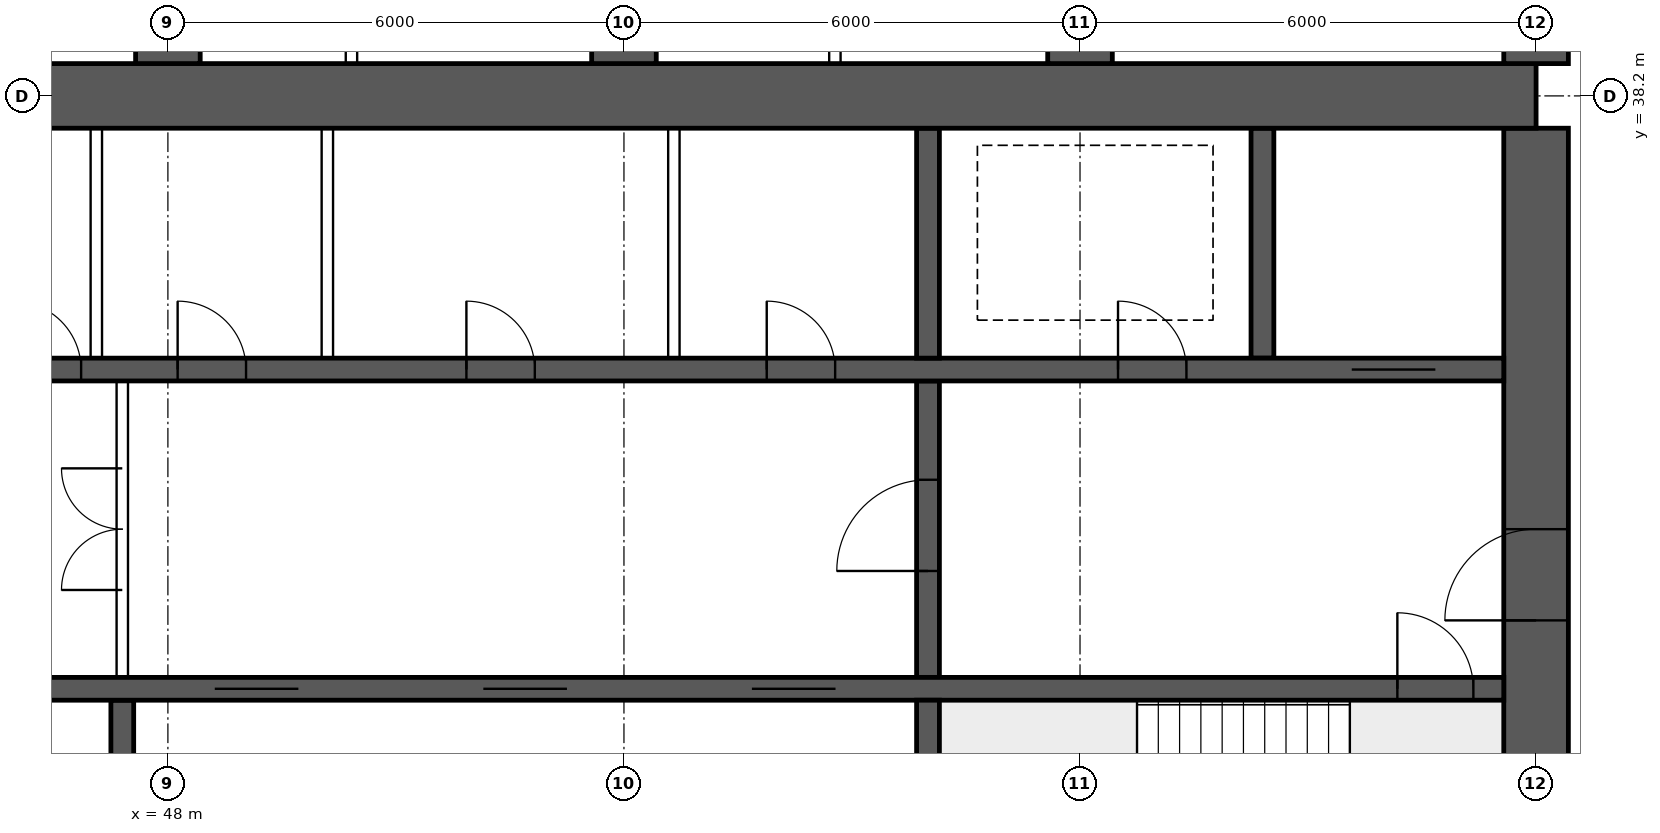
"""IFC4 building model, lengths in metres.
Left out: names, types, materials, properties, quantities, classifications, styles, units other than length and angle.
Written with IfcOpenShell. Run it as: python <this file> out.ifc"""

import sys

from ifc_helpers import new_model, si_unit, direction, frame, frame_2d, origin, place, context, subcontext, project, spatial, rectangle, extrude, element, fill, save


model = new_model("IFC4")
c1 = context("Model", 3, precision=1e-05, world=origin(), true_north=direction((0.0, 1.0)))
c2 = subcontext(c1, "Body", "Model", "MODEL_VIEW")
j1 = project(units=[si_unit("LENGTHUNIT", "METRE"), si_unit("PLANEANGLEUNIT", "RADIAN")], contexts=[c1])
p1 = place(None, origin())
s1 = spatial("IfcSite", under=j1, at=p1, CompositionType="ELEMENT")
p2 = place(p1, origin())
s2 = spatial("IfcBuilding", under=s1, at=p2, CompositionType="ELEMENT")
p3 = place(p2, frame((0.0, 0.0, 148.6)))
s3 = spatial("IfcBuildingStorey", under=s2, at=p3, CompositionType="ELEMENT", Elevation=148.6)
p4 = place(p3, frame((18.0, 38.2, 0.0), z_axis=(0.0, 0.0, 1.0), x_axis=(1.0, 0.0, 0.0)))
e1 = element("IfcWall", 1, at=p4, inside=s3, PredefinedType="SHEAR", context=c2, shape_type="SweptSolid", body=[
    extrude(rectangle(XDim=48.0, YDim=0.85, at=frame_2d((24.0, 0.0))), origin(), (0.0, 0.0, 1.0), 3.75),
])
p5 = place(p3, frame((66.0, 26.225, 0.0), z_axis=(0.0, 0.0, 1.0), x_axis=(0.0, 1.0, 0.0)))
e2 = element("IfcWall", 2, at=p5, inside=s3, PredefinedType="SHEAR", context=c2, shape_type="SweptSolid", body=[
    extrude(rectangle(XDim=11.55, YDim=0.85, at=frame_2d((5.775, 0.0))), origin(), (0.0, 0.0, 1.0), 3.75),
])
p6 = place(p5, frame((5.075, 0.0, 0.0)))
e3 = element("IfcOpeningElement", 3, at=p6, cuts=e2, PredefinedType="OPENING", context=c2, shape_type="SweptSolid", body=[
    extrude(rectangle(XDim=1.2, YDim=2.1, at=frame_2d((0.6, 1.05))), frame((0.0, 0.435, 0.0), z_axis=(0.0, -1.0, 0.0), x_axis=(1.0, 0.0, 0.0)), (0.0, 0.0, 1.0), 0.87),
])
p7 = place(p3, frame((18.425, 30.4, 0.0), z_axis=(0.0, 0.0, 1.0), x_axis=(1.0, 0.0, 0.0)))
e4 = element("IfcWall", 4, at=p7, inside=s3, PredefinedType="SHEAR", context=c2, shape_type="SweptSolid", body=[
    extrude(rectangle(XDim=47.15, YDim=0.3, at=frame_2d((23.575, 0.0))), origin(), (0.0, 0.0, 1.0), 3.75),
])
p8 = place(p7, frame((0.4, 0.0, 0.0)))
e5 = element("IfcOpeningElement", 5, at=p8, cuts=e4, PredefinedType="OPENING", context=c2, shape_type="SweptSolid", body=[
    extrude(rectangle(XDim=1.0, YDim=2.1, at=frame_2d((0.5, 1.05))), frame((0.0, 0.16, 0.0), z_axis=(0.0, -1.0, 0.0), x_axis=(1.0, 0.0, 0.0)), (0.0, 0.0, 1.0), 0.32),
])
p9 = place(p7, frame((45.75, 0.0, 0.0)))
e6 = element("IfcOpeningElement", 6, at=p9, cuts=e4, PredefinedType="OPENING", context=c2, shape_type="SweptSolid", body=[
    extrude(rectangle(XDim=1.0, YDim=2.1, at=frame_2d((0.5, 1.05))), frame((0.0, 0.16, 0.0), z_axis=(0.0, -1.0, 0.0), x_axis=(1.0, 0.0, 0.0)), (0.0, 0.0, 1.0), 0.32),
])
p10 = place(p7, frame((8.325, 0.0, 0.0)))
e7 = element("IfcOpeningElement", 7, at=p10, cuts=e4, PredefinedType="OPENING", context=c2, shape_type="SweptSolid", body=[
    extrude(rectangle(XDim=1.1, YDim=2.1, at=frame_2d((0.55, 1.05))), frame((0.0, 0.16, 0.0), z_axis=(0.0, -1.0, 0.0), x_axis=(1.0, 0.0, 0.0)), (0.0, 0.0, 1.0), 0.32),
])
p11 = place(p7, frame((10.925, 0.0, 0.0)))
e8 = element("IfcOpeningElement", 8, at=p11, cuts=e4, PredefinedType="OPENING", context=c2, shape_type="SweptSolid", body=[
    extrude(rectangle(XDim=1.1, YDim=2.1, at=frame_2d((0.55, 1.05))), frame((0.0, 0.16, 0.0), z_axis=(0.0, -1.0, 0.0), x_axis=(1.0, 0.0, 0.0)), (0.0, 0.0, 1.0), 0.32),
])
p12 = place(p7, frame((13.525, 0.0, 0.0)))
e9 = element("IfcOpeningElement", 9, at=p12, cuts=e4, PredefinedType="OPENING", context=c2, shape_type="SweptSolid", body=[
    extrude(rectangle(XDim=1.1, YDim=2.1, at=frame_2d((0.55, 1.05))), frame((0.0, 0.16, 0.0), z_axis=(0.0, -1.0, 0.0), x_axis=(1.0, 0.0, 0.0)), (0.0, 0.0, 1.0), 0.32),
])
p13 = place(p7, frame((16.125, 0.0, 0.0)))
e10 = element("IfcOpeningElement", 10, at=p13, cuts=e4, PredefinedType="OPENING", context=c2, shape_type="SweptSolid", body=[
    extrude(rectangle(XDim=1.1, YDim=2.1, at=frame_2d((0.55, 1.05))), frame((0.0, 0.16, 0.0), z_axis=(0.0, -1.0, 0.0), x_axis=(1.0, 0.0, 0.0)), (0.0, 0.0, 1.0), 0.32),
])
p14 = place(p7, frame((18.9, 0.0, 0.0)))
e11 = element("IfcOpeningElement", 11, at=p14, cuts=e4, PredefinedType="OPENING", context=c2, shape_type="SweptSolid", body=[
    extrude(rectangle(XDim=0.9, YDim=2.1, at=frame_2d((0.45, 1.05))), frame((0.0, 0.16, 0.0), z_axis=(0.0, -1.0, 0.0), x_axis=(1.0, 0.0, 0.0)), (0.0, 0.0, 1.0), 0.32),
])
p15 = place(p7, frame((30.192, 0.0, 0.0)))
e12 = element("IfcOpeningElement", 12, at=p15, cuts=e4, PredefinedType="OPENING", context=c2, shape_type="SweptSolid", body=[
    extrude(rectangle(XDim=1.1, YDim=2.1, at=frame_2d((0.55, 1.05))), frame((0.0, 0.16, 0.0), z_axis=(0.0, -1.0, 0.0), x_axis=(1.0, 0.0, 0.0)), (0.0, 0.0, 1.0), 0.32),
])
p16 = place(p7, frame((33.725, 0.0, 0.0)))
e13 = element("IfcOpeningElement", 13, at=p16, cuts=e4, PredefinedType="OPENING", context=c2, shape_type="SweptSolid", body=[
    extrude(rectangle(XDim=1.1, YDim=2.1, at=frame_2d((0.55, 1.05))), frame((0.0, 0.16, 0.0), z_axis=(0.0, -1.0, 0.0), x_axis=(1.0, 0.0, 0.0)), (0.0, 0.0, 1.0), 0.32),
])
p17 = place(p7, frame((37.258, 0.0, 0.0)))
e14 = element("IfcOpeningElement", 14, at=p17, cuts=e4, PredefinedType="OPENING", context=c2, shape_type="SweptSolid", body=[
    extrude(rectangle(XDim=1.1, YDim=2.1, at=frame_2d((0.55, 1.05))), frame((0.0, 0.16, 0.0), z_axis=(0.0, -1.0, 0.0), x_axis=(1.0, 0.0, 0.0)), (0.0, 0.0, 1.0), 0.32),
])
p18 = place(p3, frame((18.425, 34.6, 0.0), z_axis=(0.0, 0.0, 1.0), x_axis=(1.0, 0.0, 0.0)))
e15 = element("IfcWall", 15, at=p18, inside=s3, PredefinedType="SHEAR", context=c2, shape_type="SweptSolid", body=[
    extrude(rectangle(XDim=47.15, YDim=0.3, at=frame_2d((23.575, 0.0))), origin(), (0.0, 0.0, 1.0), 3.75),
])
p19 = place(p18, frame((0.9, 0.0, 0.0)))
e16 = element("IfcOpeningElement", 16, at=p19, cuts=e15, PredefinedType="OPENING", context=c2, shape_type="SweptSolid", body=[
    extrude(rectangle(XDim=1.1, YDim=2.1, at=frame_2d((0.55, 1.05))), frame((0.0, 0.16, 0.0), z_axis=(0.0, -1.0, 0.0), x_axis=(1.0, 0.0, 0.0)), (0.0, 0.0, 1.0), 0.32),
])
p20 = place(p18, frame((45.15, 0.0, 0.0)))
e17 = element("IfcOpeningElement", 17, at=p20, cuts=e15, PredefinedType="OPENING", context=c2, shape_type="SweptSolid", body=[
    extrude(rectangle(XDim=1.1, YDim=2.1, at=frame_2d((0.55, 1.05))), frame((0.0, 0.16, 0.0), z_axis=(0.0, -1.0, 0.0), x_axis=(1.0, 0.0, 0.0)), (0.0, 0.0, 1.0), 0.32),
])
p21 = place(p18, frame((4.175, 0.0, 0.0)))
e18 = element("IfcOpeningElement", 18, at=p21, cuts=e15, PredefinedType="OPENING", context=c2, shape_type="SweptSolid", body=[
    extrude(rectangle(XDim=0.9, YDim=2.1, at=frame_2d((0.45, 1.05))), frame((0.0, 0.16, 0.0), z_axis=(0.0, -1.0, 0.0), x_axis=(1.0, 0.0, 0.0)), (0.0, 0.0, 1.0), 0.32),
])
p22 = place(p18, frame((42.075, 0.0, 0.0)))
e19 = element("IfcOpeningElement", 19, at=p22, cuts=e15, PredefinedType="OPENING", context=c2, shape_type="SweptSolid", body=[
    extrude(rectangle(XDim=0.9, YDim=2.1, at=frame_2d((0.45, 1.05))), frame((0.0, 0.16, 0.0), z_axis=(0.0, -1.0, 0.0), x_axis=(1.0, 0.0, 0.0)), (0.0, 0.0, 1.0), 0.32),
])
p23 = place(p18, frame((8.95, 0.0, 0.0)))
e20 = element("IfcOpeningElement", 20, at=p23, cuts=e15, PredefinedType="OPENING", context=c2, shape_type="SweptSolid", body=[
    extrude(rectangle(XDim=0.9, YDim=2.1, at=frame_2d((0.45, 1.05))), frame((0.0, 0.16, 0.0), z_axis=(0.0, -1.0, 0.0), x_axis=(1.0, 0.0, 0.0)), (0.0, 0.0, 1.0), 0.32),
])
p24 = place(p18, frame((12.924, 0.0, 0.0)))
e21 = element("IfcOpeningElement", 21, at=p24, cuts=e15, PredefinedType="OPENING", context=c2, shape_type="SweptSolid", body=[
    extrude(rectangle(XDim=0.9, YDim=2.1, at=frame_2d((0.45, 1.05))), frame((0.0, 0.16, 0.0), z_axis=(0.0, -1.0, 0.0), x_axis=(1.0, 0.0, 0.0)), (0.0, 0.0, 1.0), 0.32),
])
p25 = place(p18, frame((16.571, 0.0, 0.0)))
e22 = element("IfcOpeningElement", 22, at=p25, cuts=e15, PredefinedType="OPENING", context=c2, shape_type="SweptSolid", body=[
    extrude(rectangle(XDim=0.9, YDim=2.1, at=frame_2d((0.45, 1.05))), frame((0.0, 0.16, 0.0), z_axis=(0.0, -1.0, 0.0), x_axis=(1.0, 0.0, 0.0)), (0.0, 0.0, 1.0), 0.32),
])
p26 = place(p18, frame((20.33, 0.0, 0.0)))
e23 = element("IfcOpeningElement", 23, at=p26, cuts=e15, PredefinedType="OPENING", context=c2, shape_type="SweptSolid", body=[
    extrude(rectangle(XDim=0.9, YDim=2.1, at=frame_2d((0.45, 1.05))), frame((0.0, 0.16, 0.0), z_axis=(0.0, -1.0, 0.0), x_axis=(1.0, 0.0, 0.0)), (0.0, 0.0, 1.0), 0.32),
])
p27 = place(p18, frame((24.736, 0.0, 0.0)))
e24 = element("IfcOpeningElement", 24, at=p27, cuts=e15, PredefinedType="OPENING", context=c2, shape_type="SweptSolid", body=[
    extrude(rectangle(XDim=0.9, YDim=2.1, at=frame_2d((0.45, 1.05))), frame((0.0, 0.16, 0.0), z_axis=(0.0, -1.0, 0.0), x_axis=(1.0, 0.0, 0.0)), (0.0, 0.0, 1.0), 0.32),
])
p28 = place(p18, frame((27.533, 0.0, 0.0)))
e25 = element("IfcOpeningElement", 25, at=p28, cuts=e15, PredefinedType="OPENING", context=c2, shape_type="SweptSolid", body=[
    extrude(rectangle(XDim=0.9, YDim=2.1, at=frame_2d((0.45, 1.05))), frame((0.0, 0.16, 0.0), z_axis=(0.0, -1.0, 0.0), x_axis=(1.0, 0.0, 0.0)), (0.0, 0.0, 1.0), 0.32),
])
p29 = place(p18, frame((29.703, 0.0, 0.0)))
e26 = element("IfcOpeningElement", 26, at=p29, cuts=e15, PredefinedType="OPENING", context=c2, shape_type="SweptSolid", body=[
    extrude(rectangle(XDim=0.9, YDim=2.1, at=frame_2d((0.45, 1.05))), frame((0.0, 0.16, 0.0), z_axis=(0.0, -1.0, 0.0), x_axis=(1.0, 0.0, 0.0)), (0.0, 0.0, 1.0), 0.32),
])
p30 = place(p18, frame((33.502, 0.0, 0.0)))
e27 = element("IfcOpeningElement", 27, at=p30, cuts=e15, PredefinedType="OPENING", context=c2, shape_type="SweptSolid", body=[
    extrude(rectangle(XDim=0.9, YDim=2.1, at=frame_2d((0.45, 1.05))), frame((0.0, 0.16, 0.0), z_axis=(0.0, -1.0, 0.0), x_axis=(1.0, 0.0, 0.0)), (0.0, 0.0, 1.0), 0.32),
])
p31 = place(p18, frame((37.453, 0.0, 0.0)))
e28 = element("IfcOpeningElement", 28, at=p31, cuts=e15, PredefinedType="OPENING", context=c2, shape_type="SweptSolid", body=[
    extrude(rectangle(XDim=0.9, YDim=2.1, at=frame_2d((0.45, 1.05))), frame((0.0, 0.16, 0.0), z_axis=(0.0, -1.0, 0.0), x_axis=(1.0, 0.0, 0.0)), (0.0, 0.0, 1.0), 0.32),
])
p32 = place(p3, frame((58.0, 26.225, 0.0), z_axis=(0.0, 0.0, 1.0), x_axis=(0.0, 1.0, 0.0)))
e29 = element("IfcWall", 29, at=p32, inside=s3, PredefinedType="SHEAR", context=c2, shape_type="SweptSolid", body=[
    extrude(rectangle(XDim=4.025, YDim=0.3, at=frame_2d((2.012, 0.0))), origin(), (0.0, 0.0, 1.0), 3.75),
])
p33 = place(p3, frame((58.0, 30.55, 0.0), z_axis=(0.0, 0.0, 1.0), x_axis=(0.0, 1.0, 0.0)))
e30 = element("IfcWall", 30, at=p33, inside=s3, PredefinedType="SHEAR", context=c2, shape_type="SweptSolid", body=[
    extrude(rectangle(XDim=3.9, YDim=0.3, at=frame_2d((1.95, 0.0))), origin(), (0.0, 0.0, 1.0), 3.75),
])
p34 = place(p33, frame((1.4, 0.0, 0.0)))
e31 = element("IfcOpeningElement", 31, at=p34, cuts=e30, PredefinedType="OPENING", context=c2, shape_type="SweptSolid", body=[
    extrude(rectangle(XDim=1.2, YDim=2.1, at=frame_2d((0.6, 1.05))), frame((0.0, 0.16, 0.0), z_axis=(0.0, -1.0, 0.0), x_axis=(1.0, 0.0, 0.0)), (0.0, 0.0, 1.0), 0.32),
])
for number, where, z_axis, x_axis in (
    (32, (62.4, 34.75, 0.0), (0.0, 0.0, 1.0), (0.0, 1.0, 0.0)),
    (33, (58.0, 34.75, 0.0), (0.0, 0.0, 1.0), (0.0, 1.0, 0.0)),
):
    element("IfcWall", number, at=place(p3, frame(where, z_axis=z_axis, x_axis=x_axis)), inside=s3, PredefinedType="SHEAR", context=c2, shape_type="SweptSolid", body=[
        extrude(rectangle(XDim=3.025, YDim=0.3, at=frame_2d((1.512, 0.0))), origin(), (0.0, 0.0, 1.0), 3.75),
    ])
p35 = place(p3, frame((47.4, 26.225, 0.0), z_axis=(0.0, 0.0, 1.0), x_axis=(0.0, 1.0, 0.0)))
e34 = element("IfcWall", 34, at=p35, inside=s3, PredefinedType="SHEAR", context=c2, shape_type="SweptSolid", body=[
    extrude(rectangle(XDim=4.025, YDim=0.3, at=frame_2d((2.012, 0.0))), origin(), (0.0, 0.0, 1.0), 3.75),
])
for number, where, z_axis, x_axis in (
    (35, (48.0, 38.625, 0.0), (0.0, 0.0, 1.0), (0.0, 1.0, 0.0)),
    (36, (54.0, 38.625, 0.0), (0.0, 0.0, 1.0), (0.0, 1.0, 0.0)),
    (37, (60.0, 38.625, 0.0), (0.0, 0.0, 1.0), (0.0, 1.0, 0.0)),
    (38, (66.0, 38.625, 0.0), (0.0, 0.0, 1.0), (0.0, 1.0, 0.0)),
):
    element("IfcWall", number, at=place(p3, frame(where, z_axis=z_axis, x_axis=x_axis)), inside=s3, PredefinedType="SHEAR", context=c2, shape_type="SweptSolid", body=[
        extrude(rectangle(XDim=8.175, YDim=0.85, at=frame_2d((4.087, 0.0))), origin(), (0.0, 0.0, 1.0), 3.75),
    ])
p36 = place(p3, frame((47.4, 30.55, 0.0), z_axis=(0.0, 0.0, 1.0), x_axis=(0.0, 1.0, 0.0)))
e39 = element("IfcWall", 39, at=p36, inside=s3, PredefinedType="SOLIDWALL", context=c2, shape_type="SweptSolid", body=[
    extrude(rectangle(XDim=3.9, YDim=0.15, at=frame_2d((1.95, 0.0))), origin(), (0.0, 0.0, 1.0), 3.5),
])
p37 = place(p36, frame((1.15, 0.0, 0.0)))
e40 = element("IfcOpeningElement", 40, at=p37, cuts=e39, PredefinedType="OPENING", context=c2, shape_type="SweptSolid", body=[
    extrude(rectangle(XDim=1.6, YDim=2.1, at=frame_2d((0.8, 1.05))), frame((0.0, 0.085, 0.0), z_axis=(0.0, -1.0, 0.0), x_axis=(1.0, 0.0, 0.0)), (0.0, 0.0, 1.0), 0.17),
])
for number, where, z_axis, x_axis in (
    (41, (47.058, 34.75, 0.0), (0.0, 0.0, 1.0), (0.0, 1.0, 0.0)),
    (42, (50.098, 34.75, 0.0), (0.0, 0.0, 1.0), (0.0, 1.0, 0.0)),
    (43, (54.657, 34.75, 0.0), (0.0, 0.0, 1.0), (0.0, 1.0, 0.0)),
):
    element("IfcWall", number, at=place(p3, frame(where, z_axis=z_axis, x_axis=x_axis)), inside=s3, PredefinedType="SOLIDWALL", context=c2, shape_type="SweptSolid", body=[
        extrude(rectangle(XDim=3.025, YDim=0.15, at=frame_2d((1.512, 0.0))), origin(), (0.0, 0.0, 1.0), 3.5),
    ])
for number, where, z_axis, x_axis in (
    (44, (50.415, 38.625, 0.0), (0.0, 0.0, 1.0), (0.0, 1.0, 0.0)),
    (45, (56.775, 38.625, 0.0), (0.0, 0.0, 1.0), (0.0, 1.0, 0.0)),
):
    element("IfcWall", number, at=place(p3, frame(where, z_axis=z_axis, x_axis=x_axis)), inside=s3, PredefinedType="PARTITIONING", context=c2, shape_type="SweptSolid", body=[
        extrude(rectangle(XDim=8.075, YDim=0.15, at=frame_2d((4.038, 0.0))), origin(), (0.0, 0.0, 1.0), 3.5),
    ])
p38 = place(p37, origin())
e46 = element("IfcDoor", 46, at=p38, inside=s3, OperationType="DOUBLE_DOOR_SINGLE_SWING", PredefinedType="DOOR", context=c2, shape_type="SweptSolid", body=[
    extrude(rectangle(XDim=1.6, YDim=2.1, at=frame_2d((0.8, 1.05))), frame((0.0, 0.025, 0.0), z_axis=(0.0, -1.0, 0.0), x_axis=(1.0, 0.0, 0.0)), (0.0, 0.0, 1.0), 0.05),
])
fill(e40, e46)
p39 = place(p6, origin())
e47 = element("IfcDoor", 47, at=p39, inside=s3, OperationType="SINGLE_SWING_LEFT", PredefinedType="DOOR", context=c2, shape_type="SweptSolid", body=[
    extrude(rectangle(XDim=1.2, YDim=2.1, at=frame_2d((0.6, 1.05))), frame((0.0, 0.025, 0.0), z_axis=(0.0, -1.0, 0.0), x_axis=(1.0, 0.0, 0.0)), (0.0, 0.0, 1.0), 0.05),
])
fill(e3, e47)
p40 = place(p9, origin())
e48 = element("IfcDoor", 48, at=p40, inside=s3, OperationType="SINGLE_SWING_LEFT", PredefinedType="DOOR", context=c2, shape_type="SweptSolid", body=[
    extrude(rectangle(XDim=1.0, YDim=2.1, at=frame_2d((0.5, 1.05))), frame((0.0, 0.025, 0.0), z_axis=(0.0, -1.0, 0.0), x_axis=(1.0, 0.0, 0.0)), (0.0, 0.0, 1.0), 0.05),
])
fill(e6, e48)
p41 = place(p20, origin())
e49 = element("IfcDoor", 49, at=p41, inside=s3, OperationType="DOUBLE_DOOR_SLIDING", PredefinedType="DOOR", context=c2, shape_type="SweptSolid", body=[
    extrude(rectangle(XDim=1.1, YDim=2.1, at=frame_2d((0.55, 1.05))), frame((0.0, 0.025, 0.0), z_axis=(0.0, -1.0, 0.0), x_axis=(1.0, 0.0, 0.0)), (0.0, 0.0, 1.0), 0.05),
])
fill(e17, e49)
p42 = place(p22, origin())
e50 = element("IfcDoor", 50, at=p42, inside=s3, OperationType="SINGLE_SWING_LEFT", PredefinedType="DOOR", context=c2, shape_type="SweptSolid", body=[
    extrude(rectangle(XDim=0.9, YDim=2.1, at=frame_2d((0.45, 1.05))), frame((0.0, 0.025, 0.0), z_axis=(0.0, -1.0, 0.0), x_axis=(1.0, 0.0, 0.0)), (0.0, 0.0, 1.0), 0.05),
])
fill(e19, e50)
p43 = place(p34, origin())
e51 = element("IfcDoor", 51, at=p43, inside=s3, OperationType="SINGLE_SWING_LEFT", PredefinedType="DOOR", context=c2, shape_type="SweptSolid", body=[
    extrude(rectangle(XDim=1.2, YDim=2.1, at=frame_2d((0.6, 1.05))), frame((0.0, 0.025, 0.0), z_axis=(0.0, -1.0, 0.0), x_axis=(1.0, 0.0, 0.0)), (0.0, 0.0, 1.0), 0.05),
])
fill(e31, e51)
p44 = place(p28, origin())
e52 = element("IfcDoor", 52, at=p44, inside=s3, OperationType="SINGLE_SWING_LEFT", PredefinedType="DOOR", context=c2, shape_type="SweptSolid", body=[
    extrude(rectangle(XDim=0.9, YDim=2.1, at=frame_2d((0.45, 1.05))), frame((0.0, 0.025, 0.0), z_axis=(0.0, -1.0, 0.0), x_axis=(1.0, 0.0, 0.0)), (0.0, 0.0, 1.0), 0.05),
])
fill(e25, e52)
p45 = place(p29, origin())
e53 = element("IfcDoor", 53, at=p45, inside=s3, OperationType="SINGLE_SWING_LEFT", PredefinedType="DOOR", context=c2, shape_type="SweptSolid", body=[
    extrude(rectangle(XDim=0.9, YDim=2.1, at=frame_2d((0.45, 1.05))), frame((0.0, 0.025, 0.0), z_axis=(0.0, -1.0, 0.0), x_axis=(1.0, 0.0, 0.0)), (0.0, 0.0, 1.0), 0.05),
])
fill(e26, e53)
p46 = place(p30, origin())
e54 = element("IfcDoor", 54, at=p46, inside=s3, OperationType="SINGLE_SWING_LEFT", PredefinedType="DOOR", context=c2, shape_type="SweptSolid", body=[
    extrude(rectangle(XDim=0.9, YDim=2.1, at=frame_2d((0.45, 1.05))), frame((0.0, 0.025, 0.0), z_axis=(0.0, -1.0, 0.0), x_axis=(1.0, 0.0, 0.0)), (0.0, 0.0, 1.0), 0.05),
])
fill(e27, e54)
p47 = place(p31, origin())
e55 = element("IfcDoor", 55, at=p47, inside=s3, OperationType="SINGLE_SWING_LEFT", PredefinedType="DOOR", context=c2, shape_type="SweptSolid", body=[
    extrude(rectangle(XDim=0.9, YDim=2.1, at=frame_2d((0.45, 1.05))), frame((0.0, 0.025, 0.0), z_axis=(0.0, -1.0, 0.0), x_axis=(1.0, 0.0, 0.0)), (0.0, 0.0, 1.0), 0.05),
])
fill(e28, e55)
p48 = place(p15, origin())
e56 = element("IfcDoor", 56, at=p48, inside=s3, OperationType="DOUBLE_DOOR_SLIDING", PredefinedType="DOOR", context=c2, shape_type="SweptSolid", body=[
    extrude(rectangle(XDim=1.1, YDim=2.1, at=frame_2d((0.55, 1.05))), frame((0.0, 0.025, 0.0), z_axis=(0.0, -1.0, 0.0), x_axis=(1.0, 0.0, 0.0)), (0.0, 0.0, 1.0), 0.05),
])
fill(e12, e56)
p49 = place(p16, origin())
e57 = element("IfcDoor", 57, at=p49, inside=s3, OperationType="DOUBLE_DOOR_SLIDING", PredefinedType="DOOR", context=c2, shape_type="SweptSolid", body=[
    extrude(rectangle(XDim=1.1, YDim=2.1, at=frame_2d((0.55, 1.05))), frame((0.0, 0.025, 0.0), z_axis=(0.0, -1.0, 0.0), x_axis=(1.0, 0.0, 0.0)), (0.0, 0.0, 1.0), 0.05),
])
fill(e13, e57)
p50 = place(p17, origin())
e58 = element("IfcDoor", 58, at=p50, inside=s3, OperationType="DOUBLE_DOOR_SLIDING", PredefinedType="DOOR", context=c2, shape_type="SweptSolid", body=[
    extrude(rectangle(XDim=1.1, YDim=2.1, at=frame_2d((0.55, 1.05))), frame((0.0, 0.025, 0.0), z_axis=(0.0, -1.0, 0.0), x_axis=(1.0, 0.0, 0.0)), (0.0, 0.0, 1.0), 0.05),
])
fill(e14, e58)
save(model, sys.argv[1])
